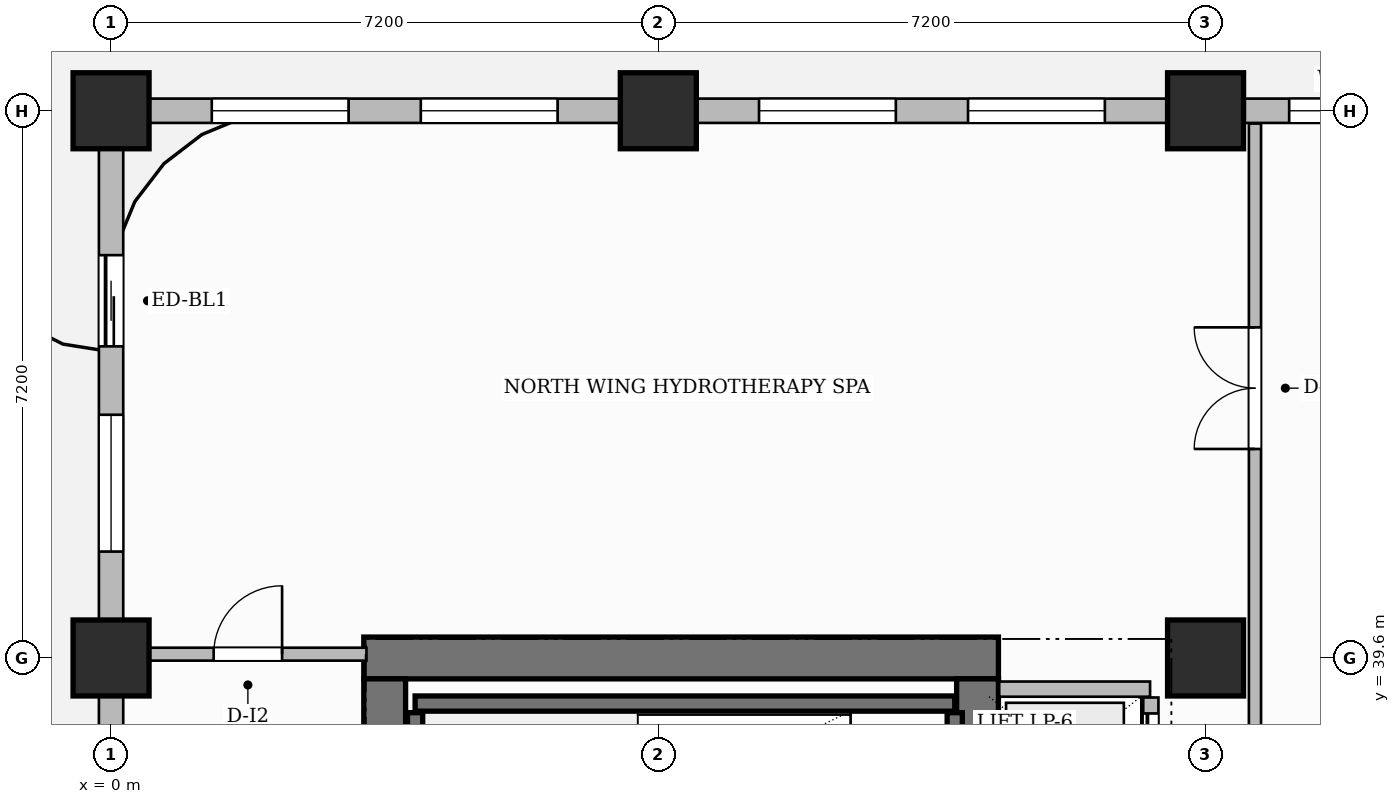
"""IFC4 building model, lengths in metres.
Left out: names, types, materials, properties, quantities, classifications, styles, units other than length and angle.
Written with IfcOpenShell. Run it as: python <this file> out.ifc"""

import sys

from ifc_helpers import new_model, si_unit, direction, frame, frame_2d, origin, origin_2d, place, context, subcontext, project, spatial, rectangle, extrude, source, transform, mapped, element, fill, save


model = new_model("IFC4")
c1 = context("Model", 3, precision=1e-05, world=origin(), true_north=direction((0.0, 1.0)))
c2 = subcontext(c1, "Body", "Model", "MODEL_VIEW")
j1 = project(units=[si_unit("LENGTHUNIT", "METRE"), si_unit("PLANEANGLEUNIT", "RADIAN")], contexts=[c1])
p1 = place(None, origin())
s1 = spatial("IfcSite", under=j1, at=p1, CompositionType="ELEMENT")
p2 = place(p1, origin())
s2 = spatial("IfcBuilding", under=s1, at=p2, CompositionType="ELEMENT")
p3 = place(p2, frame((0.0, 0.0, 130.3)))
s3 = spatial("IfcBuildingStorey", under=s2, at=p3, CompositionType="ELEMENT", Elevation=130.3)
p4 = place(p3, frame((3.325, 39.6, 0.0), z_axis=(0.0, 0.0, 1.0), x_axis=(1.0, 0.0, 0.0)))
e1 = element("IfcWall", 1, at=p4, inside=s3, PredefinedType="SHEAR", context=c2, shape_type="SweptSolid", body=[
    extrude(rectangle(XDim=8.35, YDim=0.55, at=frame_2d((4.175, 0.0))), origin(), (0.0, 0.0, 1.0), 3.7),
])
p5 = place(p3, frame((3.6, 25.475, 0.0), z_axis=(0.0, 0.0, 1.0), x_axis=(0.0, 1.0, 0.0)))
e2 = element("IfcWall", 2, at=p5, inside=s3, PredefinedType="SHEAR", context=c2, shape_type="SweptSolid", body=[
    extrude(rectangle(XDim=13.85, YDim=0.55, at=frame_2d((6.925, 0.0))), origin(), (0.0, 0.0, 1.0), 3.7),
])
p6 = place(p3, frame((11.4, 25.475, 0.0), z_axis=(0.0, 0.0, 1.0), x_axis=(0.0, 1.0, 0.0)))
e3 = element("IfcWall", 3, at=p6, inside=s3, PredefinedType="SHEAR", context=c2, shape_type="SweptSolid", body=[
    extrude(rectangle(XDim=13.85, YDim=0.55, at=frame_2d((6.925, 0.0))), origin(), (0.0, 0.0, 1.0), 3.7),
])
p7 = place(p6, frame((6.495, 0.0, 0.0)))
e4 = element("IfcOpeningElement", 4, at=p7, cuts=e3, PredefinedType="OPENING", context=c2, shape_type="SweptSolid", body=[
    extrude(rectangle(XDim=1.5, YDim=2.2, at=frame_2d((0.75, 1.1))), frame((0.0, 0.285, 0.0), z_axis=(0.0, -1.0, 0.0), x_axis=(1.0, 0.0, 0.0)), (0.0, 0.0, 1.0), 0.57),
])
m1 = source(origin(), c2, "Body", "SweptSolid", [
    extrude(rectangle(XDim=1.0, YDim=1.0, at=origin_2d()), origin(), (0.0, 0.0, 1.0), 3.7),
])
for number, where, z_axis, x_axis in (
    (5, (0.0, 39.6, 0.0), (0.0, 0.0, 1.0), (1.0, 0.0, 0.0)),
    (6, (0.0, 46.8, 0.0), (0.0, 0.0, 1.0), (1.0, 0.0, 0.0)),
    (7, (7.2, 46.8, 0.0), (0.0, 0.0, 1.0), (1.0, 0.0, 0.0)),
    (8, (14.4, 39.6, 0.0), (0.0, 0.0, 1.0), (1.0, 0.0, 0.0)),
    (9, (14.4, 46.8, 0.0), (0.0, 0.0, 1.0), (1.0, 0.0, 0.0)),
):
    element("IfcColumn", number, at=place(p3, frame(where, z_axis=z_axis, x_axis=x_axis)), inside=s3, PredefinedType="COLUMN", context=c2, shape_type="MappedRepresentation", body=[
        mapped(m1, transform((0.0, 0.0, 0.0), scale=1.0)),
    ])
p8 = place(p3, frame((4.0, 39.0, 0.0), z_axis=(0.0, 0.0, 1.0), x_axis=(1.0, 0.0, 0.0)))
e10 = element("IfcWall", 10, at=p8, inside=s3, PredefinedType="SHEAR", context=c2, shape_type="SweptSolid", body=[
    extrude(rectangle(XDim=7.1, YDim=0.2, at=frame_2d((3.55, 0.0))), origin(), (0.0, 0.0, 1.0), 3.7),
])
for number, where, z_axis, x_axis in (
    (11, (4.0, 36.18, 0.0), (0.0, 0.0, 1.0), (0.0, 1.0, 0.0)),
    (12, (11.1, 36.18, 0.0), (0.0, 0.0, 1.0), (0.0, 1.0, 0.0)),
):
    element("IfcWall", number, at=place(p3, frame(where, z_axis=z_axis, x_axis=x_axis)), inside=s3, PredefinedType="SHEAR", context=c2, shape_type="SweptSolid", body=[
        extrude(rectangle(XDim=2.7, YDim=0.2, at=frame_2d((1.35, 0.0))), origin(), (0.0, 0.0, 1.0), 3.7),
    ])
p9 = place(p3, frame((11.685, 39.19, 0.0), z_axis=(0.0, 0.0, 1.0), x_axis=(1.0, 0.0, 0.0)))
e13 = element("IfcWall", 13, at=p9, inside=s3, PredefinedType="PARTITIONING", context=c2, shape_type="SweptSolid", body=[
    extrude(rectangle(XDim=1.985, YDim=0.2, at=frame_2d((0.992, 0.0))), origin(), (0.0, 0.0, 1.0), 3.45),
])
p10 = place(p3, frame((13.68, 34.36, 0.0), z_axis=(0.0, 0.0, 1.0), x_axis=(0.0, 1.0, 0.0)))
e14 = element("IfcWall", 14, at=p10, inside=s3, PredefinedType="PARTITIONING", context=c2, shape_type="SweptSolid", body=[
    extrude(rectangle(XDim=4.72, YDim=0.2, at=frame_2d((2.36, 0.0))), origin(), (0.0, 0.0, 1.0), 3.45),
])
p11 = place(p10, frame((0.21, 0.0, 0.0)))
e15 = element("IfcOpeningElement", 15, at=p11, cuts=e14, PredefinedType="OPENING", context=c2, shape_type="SweptSolid", body=[
    extrude(rectangle(XDim=1.1, YDim=2.2, at=frame_2d((0.55, 1.1))), frame((0.0, 0.11, 0.0), z_axis=(0.0, -1.0, 0.0), x_axis=(1.0, 0.0, 0.0)), (0.0, 0.0, 1.0), 0.22),
])
p12 = place(p10, frame((1.81, 0.0, 0.0)))
e16 = element("IfcOpeningElement", 16, at=p12, cuts=e14, PredefinedType="OPENING", context=c2, shape_type="SweptSolid", body=[
    extrude(rectangle(XDim=1.1, YDim=2.2, at=frame_2d((0.55, 1.1))), frame((0.0, 0.11, 0.0), z_axis=(0.0, -1.0, 0.0), x_axis=(1.0, 0.0, 0.0)), (0.0, 0.0, 1.0), 0.22),
])
p13 = place(p10, frame((3.41, 0.0, 0.0)))
e17 = element("IfcOpeningElement", 17, at=p13, cuts=e14, PredefinedType="OPENING", context=c2, shape_type="SweptSolid", body=[
    extrude(rectangle(XDim=1.1, YDim=2.2, at=frame_2d((0.55, 1.1))), frame((0.0, 0.11, 0.0), z_axis=(0.0, -1.0, 0.0), x_axis=(1.0, 0.0, 0.0)), (0.0, 0.0, 1.0), 0.22),
])
p14 = place(p3, frame((0.24, 39.65, 0.0), z_axis=(0.0, 0.0, 1.0), x_axis=(1.0, 0.0, 0.0)))
e18 = element("IfcWall", 18, at=p14, inside=s3, PredefinedType="PARTITIONING", context=c2, shape_type="SweptSolid", body=[
    extrude(rectangle(XDim=3.12, YDim=0.17, at=frame_2d((1.56, 0.0))), origin(), (0.0, 0.0, 1.0), 3.45),
])
p15 = place(p14, frame((1.11, 0.0, 0.0)))
e19 = element("IfcOpeningElement", 19, at=p15, cuts=e18, PredefinedType="OPENING", context=c2, shape_type="SweptSolid", body=[
    extrude(rectangle(XDim=0.9, YDim=2.15, at=frame_2d((0.45, 1.075))), frame((0.0, 0.095, 0.0), z_axis=(0.0, -1.0, 0.0), x_axis=(1.0, 0.0, 0.0)), (0.0, 0.0, 1.0), 0.19),
])
p16 = place(p3, frame((15.05, 34.34, 0.0), z_axis=(0.0, 0.0, 1.0), x_axis=(0.0, 1.0, 0.0)))
e20 = element("IfcWall", 20, at=p16, inside=s3, PredefinedType="PARTITIONING", context=c2, shape_type="SweptSolid", body=[
    extrude(rectangle(XDim=12.292, YDim=0.16, at=frame_2d((6.146, 0.0))), origin(), (0.0, 0.0, 1.0), 3.45),
])
p17 = place(p16, frame((8.01, 0.0, 0.0)))
e21 = element("IfcOpeningElement", 21, at=p17, cuts=e20, PredefinedType="OPENING", context=c2, shape_type="SweptSolid", body=[
    extrude(rectangle(XDim=1.6, YDim=2.4, at=frame_2d((0.8, 1.2))), frame((0.0, 0.09, 0.0), z_axis=(0.0, -1.0, 0.0), x_axis=(1.0, 0.0, 0.0)), (0.0, 0.0, 1.0), 0.18),
])
p18 = place(p3, frame((0.0, 25.25, 0.0), z_axis=(0.0, 0.0, 1.0), x_axis=(0.0, 1.0, 0.0)))
e22 = element("IfcWall", 22, at=p18, inside=s3, PredefinedType="SOLIDWALL", context=c2, shape_type="SweptSolid", body=[
    extrude(rectangle(XDim=21.5, YDim=0.32, at=frame_2d((10.75, 0.0))), origin(), (0.0, 0.0, 1.0), 2.935),
])
p19 = place(p18, frame((18.45, 0.0, 0.0)))
e23 = element("IfcOpeningElement", 23, at=p19, cuts=e22, PredefinedType="OPENING", context=c2, shape_type="SweptSolid", body=[
    extrude(rectangle(XDim=1.2, YDim=2.2, at=frame_2d((0.6, 1.1))), frame((0.0, 0.17, 0.0), z_axis=(0.0, -1.0, 0.0), x_axis=(1.0, 0.0, 0.0)), (0.0, 0.0, 1.0), 0.34),
])
p20 = place(p18, frame((0.8, 0.0, 0.0)))
e24 = element("IfcOpeningElement", 24, at=p20, cuts=e22, PredefinedType="OPENING", context=c2, shape_type="SweptSolid", body=[
    extrude(rectangle(XDim=1.2, YDim=2.2, at=frame_2d((0.6, 1.1))), frame((0.0, 0.17, 0.0), z_axis=(0.0, -1.0, 0.0), x_axis=(1.0, 0.0, 0.0)), (0.0, 0.0, 1.0), 0.34),
])
p21 = place(p18, frame((3.425, 0.0, 0.8)))
e25 = element("IfcOpeningElement", 25, at=p21, cuts=e22, PredefinedType="OPENING", context=c2, shape_type="SweptSolid", body=[
    extrude(rectangle(XDim=1.8, YDim=1.85, at=frame_2d((0.9, 0.925))), frame((0.0, 0.17, 0.0), z_axis=(0.0, -1.0, 0.0), x_axis=(1.0, 0.0, 0.0)), (0.0, 0.0, 1.0), 0.34),
])
p22 = place(p18, frame((8.475, 0.0, 0.8)))
e26 = element("IfcOpeningElement", 26, at=p22, cuts=e22, PredefinedType="OPENING", context=c2, shape_type="SweptSolid", body=[
    extrude(rectangle(XDim=1.8, YDim=1.85, at=frame_2d((0.9, 0.925))), frame((0.0, 0.17, 0.0), z_axis=(0.0, -1.0, 0.0), x_axis=(1.0, 0.0, 0.0)), (0.0, 0.0, 1.0), 0.34),
])
p23 = place(p18, frame((11.225, 0.0, 0.8)))
e27 = element("IfcOpeningElement", 27, at=p23, cuts=e22, PredefinedType="OPENING", context=c2, shape_type="SweptSolid", body=[
    extrude(rectangle(XDim=1.8, YDim=1.85, at=frame_2d((0.9, 0.925))), frame((0.0, 0.17, 0.0), z_axis=(0.0, -1.0, 0.0), x_axis=(1.0, 0.0, 0.0)), (0.0, 0.0, 1.0), 0.34),
])
p24 = place(p18, frame((15.75, 0.0, 0.8)))
e28 = element("IfcOpeningElement", 28, at=p24, cuts=e22, PredefinedType="OPENING", context=c2, shape_type="SweptSolid", body=[
    extrude(rectangle(XDim=1.8, YDim=1.85, at=frame_2d((0.9, 0.925))), frame((0.0, 0.17, 0.0), z_axis=(0.0, -1.0, 0.0), x_axis=(1.0, 0.0, 0.0)), (0.0, 0.0, 1.0), 0.34),
])
p25 = place(p3, frame((0.0, 46.8, 0.0), z_axis=(0.0, 0.0, 1.0), x_axis=(1.0, 0.0, 0.0)))
e29 = element("IfcWall", 29, at=p25, inside=s3, PredefinedType="SOLIDWALL", context=c2, shape_type="SweptSolid", body=[
    extrude(rectangle(XDim=18.0, YDim=0.32, at=frame_2d((9.0, 0.0))), origin(), (0.0, 0.0, 1.0), 2.935),
])
p26 = place(p25, frame((1.325, 0.0, 0.8)))
e30 = element("IfcOpeningElement", 30, at=p26, cuts=e29, PredefinedType="OPENING", context=c2, shape_type="SweptSolid", body=[
    extrude(rectangle(XDim=1.8, YDim=1.85, at=frame_2d((0.9, 0.925))), frame((0.0, 0.17, 0.0), z_axis=(0.0, -1.0, 0.0), x_axis=(1.0, 0.0, 0.0)), (0.0, 0.0, 1.0), 0.34),
])
p27 = place(p25, frame((4.075, 0.0, 0.8)))
e31 = element("IfcOpeningElement", 31, at=p27, cuts=e29, PredefinedType="OPENING", context=c2, shape_type="SweptSolid", body=[
    extrude(rectangle(XDim=1.8, YDim=1.85, at=frame_2d((0.9, 0.925))), frame((0.0, 0.17, 0.0), z_axis=(0.0, -1.0, 0.0), x_axis=(1.0, 0.0, 0.0)), (0.0, 0.0, 1.0), 0.34),
])
p28 = place(p25, frame((8.525, 0.0, 0.8)))
e32 = element("IfcOpeningElement", 32, at=p28, cuts=e29, PredefinedType="OPENING", context=c2, shape_type="SweptSolid", body=[
    extrude(rectangle(XDim=1.8, YDim=1.85, at=frame_2d((0.9, 0.925))), frame((0.0, 0.17, 0.0), z_axis=(0.0, -1.0, 0.0), x_axis=(1.0, 0.0, 0.0)), (0.0, 0.0, 1.0), 0.34),
])
p29 = place(p25, frame((11.275, 0.0, 0.8)))
e33 = element("IfcOpeningElement", 33, at=p29, cuts=e29, PredefinedType="OPENING", context=c2, shape_type="SweptSolid", body=[
    extrude(rectangle(XDim=1.8, YDim=1.85, at=frame_2d((0.9, 0.925))), frame((0.0, 0.17, 0.0), z_axis=(0.0, -1.0, 0.0), x_axis=(1.0, 0.0, 0.0)), (0.0, 0.0, 1.0), 0.34),
])
p30 = place(p25, frame((15.5, 0.0, 0.8)))
e34 = element("IfcOpeningElement", 34, at=p30, cuts=e29, PredefinedType="OPENING", context=c2, shape_type="SweptSolid", body=[
    extrude(rectangle(XDim=1.4, YDim=1.85, at=frame_2d((0.7, 0.925))), frame((0.0, 0.17, 0.0), z_axis=(0.0, -1.0, 0.0), x_axis=(1.0, 0.0, 0.0)), (0.0, 0.0, 1.0), 0.34),
])
m2 = source(origin(), c2, "Body", "SweptSolid", [
    extrude(rectangle(XDim=0.9, YDim=2.15, at=frame_2d((0.45, 1.075))), frame((0.0, 0.025, 0.0), z_axis=(0.0, -1.0, 0.0), x_axis=(1.0, 0.0, 0.0)), (0.0, 0.0, 1.0), 0.05),
])
p31 = place(p15, origin())
e35 = element("IfcDoor", 35, at=p31, inside=s3, OperationType="SINGLE_SWING_RIGHT", PredefinedType="DOOR", context=c2, shape_type="MappedRepresentation", body=[
    mapped(m2, transform((0.0, 0.0, 0.0), scale=1.0)),
])
fill(e19, e35)
m3 = source(origin(), c2, "Body", "SweptSolid", [
    extrude(rectangle(XDim=1.6, YDim=2.4, at=frame_2d((0.8, 1.2))), frame((0.0, 0.025, 0.0), z_axis=(0.0, -1.0, 0.0), x_axis=(1.0, 0.0, 0.0)), (0.0, 0.0, 1.0), 0.05),
])
p32 = place(p17, origin())
e36 = element("IfcDoor", 36, at=p32, inside=s3, OperationType="DOUBLE_DOOR_SINGLE_SWING", PredefinedType="DOOR", context=c2, shape_type="MappedRepresentation", body=[
    mapped(m3, transform((0.0, 0.0, 0.0), scale=1.0)),
])
fill(e21, e36)
m4 = source(origin(), c2, "Body", "SweptSolid", [
    extrude(rectangle(XDim=1.1, YDim=2.2, at=frame_2d((0.55, 1.1))), frame((0.0, 0.025, 0.0), z_axis=(0.0, -1.0, 0.0), x_axis=(1.0, 0.0, 0.0)), (0.0, 0.0, 1.0), 0.05),
])
p33 = place(p13, origin())
e37 = element("IfcDoor", 37, at=p33, inside=s3, OperationType="SLIDING_TO_LEFT", PredefinedType="DOOR", context=c2, shape_type="MappedRepresentation", body=[
    mapped(m4, transform((0.0, 0.0, 0.0), scale=1.0)),
])
fill(e17, e37)
m5 = source(origin(), c2, "Body", "SweptSolid", [
    extrude(rectangle(XDim=1.2, YDim=2.2, at=frame_2d((0.6, 1.1))), frame((0.0, 0.025, 0.0), z_axis=(0.0, -1.0, 0.0), x_axis=(1.0, 0.0, 0.0)), (0.0, 0.0, 1.0), 0.05),
])
p34 = place(p19, origin())
e38 = element("IfcDoor", 38, at=p34, inside=s3, OperationType="SLIDING_TO_LEFT", PredefinedType="DOOR", context=c2, shape_type="MappedRepresentation", body=[
    mapped(m5, transform((0.0, 0.0, 0.0), scale=1.0)),
])
fill(e23, e38)
m6 = source(origin(), c2, "Body", "SweptSolid", [
    extrude(rectangle(XDim=1.8, YDim=1.85, at=frame_2d((0.9, 0.925))), frame((0.0, 0.03, 0.0), z_axis=(0.0, -1.0, 0.0), x_axis=(1.0, 0.0, 0.0)), (0.0, 0.0, 1.0), 0.06),
])
p35 = place(p24, origin())
e39 = element("IfcWindow", 39, at=p35, inside=s3, PartitioningType="DOUBLE_PANEL_VERTICAL", PredefinedType="WINDOW", context=c2, shape_type="MappedRepresentation", body=[
    mapped(m6, transform((0.0, 0.0, 0.0), scale=1.0)),
])
fill(e28, e39)
p36 = place(p26, origin())
e40 = element("IfcWindow", 40, at=p36, inside=s3, PartitioningType="DOUBLE_PANEL_VERTICAL", PredefinedType="WINDOW", context=c2, shape_type="MappedRepresentation", body=[
    mapped(m6, transform((0.0, 0.0, 0.0), scale=1.0)),
])
fill(e30, e40)
p37 = place(p27, origin())
e41 = element("IfcWindow", 41, at=p37, inside=s3, PartitioningType="DOUBLE_PANEL_VERTICAL", PredefinedType="WINDOW", context=c2, shape_type="MappedRepresentation", body=[
    mapped(m6, transform((0.0, 0.0, 0.0), scale=1.0)),
])
fill(e31, e41)
p38 = place(p28, origin())
e42 = element("IfcWindow", 42, at=p38, inside=s3, PartitioningType="DOUBLE_PANEL_VERTICAL", PredefinedType="WINDOW", context=c2, shape_type="MappedRepresentation", body=[
    mapped(m6, transform((0.0, 0.0, 0.0), scale=1.0)),
])
fill(e32, e42)
p39 = place(p29, origin())
e43 = element("IfcWindow", 43, at=p39, inside=s3, PartitioningType="DOUBLE_PANEL_VERTICAL", PredefinedType="WINDOW", context=c2, shape_type="MappedRepresentation", body=[
    mapped(m6, transform((0.0, 0.0, 0.0), scale=1.0)),
])
fill(e33, e43)
m7 = source(origin(), c2, "Body", "SweptSolid", [
    extrude(rectangle(XDim=1.4, YDim=1.85, at=frame_2d((0.7, 0.925))), frame((0.0, 0.03, 0.0), z_axis=(0.0, -1.0, 0.0), x_axis=(1.0, 0.0, 0.0)), (0.0, 0.0, 1.0), 0.06),
])
p40 = place(p30, origin())
e44 = element("IfcWindow", 44, at=p40, inside=s3, PartitioningType="SINGLE_PANEL", PredefinedType="WINDOW", context=c2, shape_type="MappedRepresentation", body=[
    mapped(m7, transform((0.0, 0.0, 0.0), scale=1.0)),
])
fill(e34, e44)
save(model, sys.argv[1])
